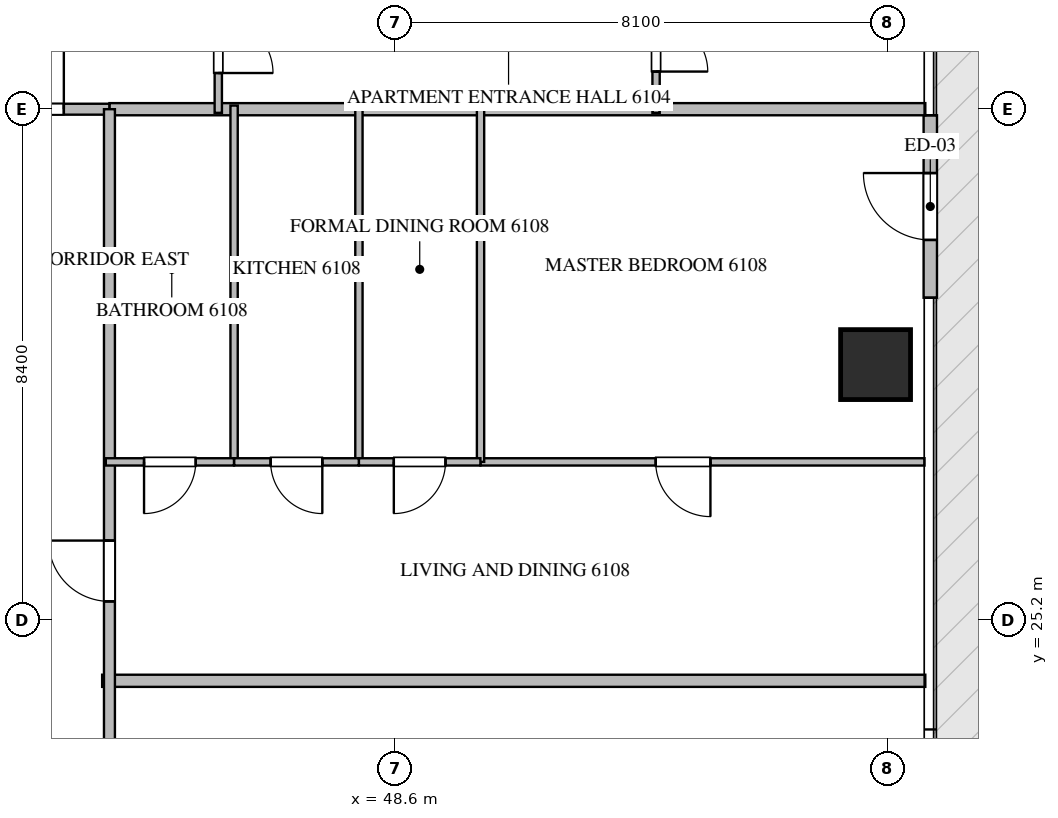
"""IFC4 building model, lengths in metres.
Left out: names, types, materials, properties, quantities, classifications, styles, units other than length and angle.
Written with IfcOpenShell. Run it as: python <this file> out.ifc"""

import sys

from ifc_helpers import new_model, si_unit, direction, frame, frame_2d, origin, origin_2d, place, context, subcontext, project, spatial, rectangle, extrude, source, transform, mapped, element, fill, save


model = new_model("IFC4")
c1 = context("Model", 3, precision=1e-05, world=origin(), true_north=direction((0.0, 1.0)))
c2 = subcontext(c1, "Body", "Model", "MODEL_VIEW")
j1 = project(units=[si_unit("LENGTHUNIT", "METRE"), si_unit("PLANEANGLEUNIT", "RADIAN")], contexts=[c1])
p1 = place(None, origin())
s1 = spatial("IfcSite", under=j1, at=p1, CompositionType="ELEMENT")
p2 = place(p1, origin())
s2 = spatial("IfcBuilding", under=s1, at=p2, CompositionType="ELEMENT")
p3 = place(p2, frame((0.0, 0.0, 245.1)))
s3 = spatial("IfcBuildingStorey", under=s2, at=p3, CompositionType="ELEMENT", Elevation=245.1)
m1 = source(origin(), c2, "Body", "SweptSolid", [
    extrude(rectangle(XDim=1.15, YDim=1.15, at=origin_2d()), origin(), (0.0, 0.0, 1.0), 3.85),
])
p4 = place(p3, frame((56.5, 29.4, -0.26), z_axis=(0.0, 0.0, 1.0), x_axis=(1.0, 0.0, 0.0)))
e1 = element("IfcColumn", 1, at=p4, inside=s3, PredefinedType="COLUMN", context=c2, shape_type="MappedRepresentation", body=[
    mapped(m1, transform((0.0, 0.0, 0.0), scale=1.0)),
])
p5 = place(p3, frame((57.4, 30.5, 0.0), z_axis=(0.0, 0.0, 1.0), x_axis=(0.0, 1.0, 0.0)))
e2 = element("IfcWall", 2, at=p5, inside=s3, PredefinedType="ELEMENTEDWALL", context=c2, shape_type="SweptSolid", body=[
    extrude(rectangle(XDim=3.0, YDim=0.22, at=frame_2d((1.5, 0.0))), origin(), (0.0, 0.0, 1.0), 3.575),
])
p6 = place(p5, frame((0.95, 0.0, 0.0)))
e3 = element("IfcOpeningElement", 3, at=p6, cuts=e2, PredefinedType="OPENING", context=c2, shape_type="SweptSolid", body=[
    extrude(rectangle(XDim=1.1, YDim=2.2, at=frame_2d((0.55, 1.1))), frame((0.0, 0.12, 0.0), z_axis=(0.0, -1.0, 0.0), x_axis=(1.0, 0.0, 0.0)), (0.0, 0.0, 1.0), 0.24),
])
p7 = place(p3, frame((43.78, 24.2, 0.0), z_axis=(0.0, 0.0, 1.0), x_axis=(1.0, 0.0, 0.0)))
e4 = element("IfcWall", 4, at=p7, inside=s3, PredefinedType="PARTITIONING", context=c2, shape_type="SweptSolid", body=[
    extrude(rectangle(XDim=13.538, YDim=0.2, at=frame_2d((6.769, 0.0))), origin(), (0.0, 0.0, 1.0), 3.59),
])
p8 = place(p3, frame((43.9, 33.6, 0.0), z_axis=(0.0, 0.0, 1.0), x_axis=(1.0, 0.0, 0.0)))
e5 = element("IfcWall", 5, at=p8, inside=s3, PredefinedType="PARTITIONING", context=c2, shape_type="SweptSolid", body=[
    extrude(rectangle(XDim=13.418, YDim=0.2, at=frame_2d((6.709, 0.0))), origin(), (0.0, 0.0, 1.0), 3.59),
])
p9 = place(p3, frame((41.402, 33.6, 0.0), z_axis=(0.0, 0.0, 1.0), x_axis=(1.0, 0.0, 0.0)))
e6 = element("IfcWall", 6, at=p9, inside=s3, PredefinedType="PARTITIONING", context=c2, shape_type="SweptSolid", body=[
    extrude(rectangle(XDim=2.496, YDim=0.18, at=frame_2d((1.248, 0.0))), origin(), (0.0, 0.0, 1.0), 3.59),
])
p10 = place(p9, frame((0.748, 0.0, 0.0)))
e7 = element("IfcOpeningElement", 7, at=p10, cuts=e6, PredefinedType="OPENING", context=c2, shape_type="SweptSolid", body=[
    extrude(rectangle(XDim=1.0, YDim=2.15, at=frame_2d((0.5, 1.075))), frame((0.0, 0.1, 0.0), z_axis=(0.0, -1.0, 0.0), x_axis=(1.0, 0.0, 0.0)), (0.0, 0.0, 1.0), 0.2),
])
p11 = place(p3, frame((43.9, 16.8, 0.0), z_axis=(0.0, 0.0, 1.0), x_axis=(0.0, 1.0, 0.0)))
e8 = element("IfcWall", 8, at=p11, inside=s3, PredefinedType="PARTITIONING", context=c2, shape_type="SweptSolid", body=[
    extrude(rectangle(XDim=16.8, YDim=0.18, at=frame_2d((8.4, 0.0))), origin(), (0.0, 0.0, 1.0), 3.59),
])
p12 = place(p11, frame((4.503, 0.0, 0.0)))
e9 = element("IfcOpeningElement", 9, at=p12, cuts=e8, PredefinedType="OPENING", context=c2, shape_type="SweptSolid", body=[
    extrude(rectangle(XDim=1.0, YDim=2.15, at=frame_2d((0.5, 1.075))), frame((0.0, 0.1, 0.0), z_axis=(0.0, -1.0, 0.0), x_axis=(1.0, 0.0, 0.0)), (0.0, 0.0, 1.0), 0.2),
])
p13 = place(p11, frame((8.706, 0.0, 0.0)))
e10 = element("IfcOpeningElement", 10, at=p13, cuts=e8, PredefinedType="OPENING", context=c2, shape_type="SweptSolid", body=[
    extrude(rectangle(XDim=1.0, YDim=2.15, at=frame_2d((0.5, 1.075))), frame((0.0, 0.1, 0.0), z_axis=(0.0, -1.0, 0.0), x_axis=(1.0, 0.0, 0.0)), (0.0, 0.0, 1.0), 0.2),
])
p14 = place(p3, frame((45.69, 35.75, 0.0), z_axis=(0.0, 0.0, 1.0), x_axis=(0.0, -1.0, 0.0)))
e11 = element("IfcWall", 11, at=p14, inside=s3, PredefinedType="PARTITIONING", context=c2, shape_type="SweptSolid", body=[
    extrude(rectangle(XDim=2.21, YDim=0.12, at=frame_2d((1.105, 0.0))), origin(), (0.0, 0.0, 1.0), 3.59),
])
p15 = place(p14, frame((0.655, 0.0, 0.0)))
e12 = element("IfcOpeningElement", 12, at=p15, cuts=e11, PredefinedType="OPENING", context=c2, shape_type="SweptSolid", body=[
    extrude(rectangle(XDim=0.9, YDim=2.1, at=frame_2d((0.45, 1.05))), frame((0.0, 0.07, 0.0), z_axis=(0.0, -1.0, 0.0), x_axis=(1.0, 0.0, 0.0)), (0.0, 0.0, 1.0), 0.14),
])
p16 = place(p3, frame((52.89, 35.748, 0.0), z_axis=(0.0, 0.0, 1.0), x_axis=(0.0, -1.0, 0.0)))
e13 = element("IfcWall", 13, at=p16, inside=s3, PredefinedType="PARTITIONING", context=c2, shape_type="SweptSolid", body=[
    extrude(rectangle(XDim=2.208, YDim=0.12, at=frame_2d((1.104, 0.0))), origin(), (0.0, 0.0, 1.0), 3.59),
])
p17 = place(p16, frame((0.679, 0.0, 0.0)))
e14 = element("IfcOpeningElement", 14, at=p17, cuts=e13, PredefinedType="OPENING", context=c2, shape_type="SweptSolid", body=[
    extrude(rectangle(XDim=0.85, YDim=2.1, at=frame_2d((0.425, 1.05))), frame((0.0, 0.07, 0.0), z_axis=(0.0, -1.0, 0.0), x_axis=(1.0, 0.0, 0.0)), (0.0, 0.0, 1.0), 0.14),
])
p18 = place(p3, frame((57.305, 27.8, 0.0), z_axis=(0.0, 0.0, 1.0), x_axis=(-1.0, 0.0, 0.0)))
e15 = element("IfcWall", 15, at=p18, inside=s3, PredefinedType="PARTITIONING", context=c2, shape_type="SweptSolid", body=[
    extrude(rectangle(XDim=7.302, YDim=0.12, at=frame_2d((3.651, 0.0))), origin(), (0.0, 0.0, 1.0), 3.59),
])
p19 = place(p18, frame((3.521, 0.0, 0.0)))
e16 = element("IfcOpeningElement", 16, at=p19, cuts=e15, PredefinedType="OPENING", context=c2, shape_type="SweptSolid", body=[
    extrude(rectangle(XDim=0.9, YDim=2.1, at=frame_2d((0.45, 1.05))), frame((0.0, 0.07, 0.0), z_axis=(0.0, -1.0, 0.0), x_axis=(1.0, 0.0, 0.0)), (0.0, 0.0, 1.0), 0.14),
])
for number, where, z_axis, x_axis in (
    (17, (50.003, 27.8, 0.0), (0.0, 0.0, 1.0), (0.0, 1.0, 0.0)),
    (18, (48.003, 27.8, 0.0), (0.0, 0.0, 1.0), (0.0, 1.0, 0.0)),
    (19, (45.95, 27.8, 0.0), (0.0, 0.0, 1.0), (0.0, 1.0, 0.0)),
):
    element("IfcWall", number, at=place(p3, frame(where, z_axis=z_axis, x_axis=x_axis)), inside=s3, PredefinedType="PARTITIONING", context=c2, shape_type="SweptSolid", body=[
        extrude(rectangle(XDim=5.86, YDim=0.12, at=frame_2d((2.93, 0.0))), origin(), (0.0, 0.0, 1.0), 3.59),
    ])
p20 = place(p3, frame((50.001, 27.8, 0.0), z_axis=(0.0, 0.0, 1.0), x_axis=(-1.0, 0.0, 0.0)))
e20 = element("IfcWall", 20, at=p20, inside=s3, PredefinedType="PARTITIONING", context=c2, shape_type="SweptSolid", body=[
    extrude(rectangle(XDim=1.998, YDim=0.12, at=frame_2d((0.999, 0.0))), origin(), (0.0, 0.0, 1.0), 3.59),
])
p21 = place(p20, frame((0.574, 0.0, 0.0)))
e21 = element("IfcOpeningElement", 21, at=p21, cuts=e20, PredefinedType="OPENING", context=c2, shape_type="SweptSolid", body=[
    extrude(rectangle(XDim=0.85, YDim=2.1, at=frame_2d((0.425, 1.05))), frame((0.0, 0.07, 0.0), z_axis=(0.0, -1.0, 0.0), x_axis=(1.0, 0.0, 0.0)), (0.0, 0.0, 1.0), 0.14),
])
p22 = place(p3, frame((48.001, 27.8, 0.0), z_axis=(0.0, 0.0, 1.0), x_axis=(-1.0, 0.0, 0.0)))
e22 = element("IfcWall", 22, at=p22, inside=s3, PredefinedType="PARTITIONING", context=c2, shape_type="SweptSolid", body=[
    extrude(rectangle(XDim=2.051, YDim=0.12, at=frame_2d((1.025, 0.0))), origin(), (0.0, 0.0, 1.0), 3.59),
])
p23 = place(p22, frame((0.6, 0.0, 0.0)))
e23 = element("IfcOpeningElement", 23, at=p23, cuts=e22, PredefinedType="OPENING", context=c2, shape_type="SweptSolid", body=[
    extrude(rectangle(XDim=0.85, YDim=2.1, at=frame_2d((0.425, 1.05))), frame((0.0, 0.07, 0.0), z_axis=(0.0, -1.0, 0.0), x_axis=(1.0, 0.0, 0.0)), (0.0, 0.0, 1.0), 0.14),
])
p24 = place(p3, frame((45.948, 27.8, 0.0), z_axis=(0.0, 0.0, 1.0), x_axis=(-1.0, 0.0, 0.0)))
e24 = element("IfcWall", 24, at=p24, inside=s3, PredefinedType="PARTITIONING", context=c2, shape_type="SweptSolid", body=[
    extrude(rectangle(XDim=2.108, YDim=0.12, at=frame_2d((1.054, 0.0))), origin(), (0.0, 0.0, 1.0), 3.59),
])
p25 = place(p24, frame((0.629, 0.0, 0.0)))
e25 = element("IfcOpeningElement", 25, at=p25, cuts=e24, PredefinedType="OPENING", context=c2, shape_type="SweptSolid", body=[
    extrude(rectangle(XDim=0.85, YDim=2.1, at=frame_2d((0.425, 1.05))), frame((0.0, 0.07, 0.0), z_axis=(0.0, -1.0, 0.0), x_axis=(1.0, 0.0, 0.0)), (0.0, 0.0, 1.0), 0.14),
])
m2 = source(origin(), c2, "Body", "SweptSolid", [
    extrude(rectangle(XDim=1.1, YDim=2.2, at=frame_2d((0.55, 1.1))), frame((0.0, 0.025, 0.0), z_axis=(0.0, -1.0, 0.0), x_axis=(1.0, 0.0, 0.0)), (0.0, 0.0, 1.0), 0.05),
])
p26 = place(p6, origin())
e26 = element("IfcDoor", 26, at=p26, inside=s3, OperationType="SINGLE_SWING_RIGHT", PredefinedType="DOOR", context=c2, shape_type="MappedRepresentation", body=[
    mapped(m2, transform((0.0, 0.0, 0.0), scale=1.0)),
])
fill(e3, e26)
m3 = source(origin(), c2, "Body", "SweptSolid", [
    extrude(rectangle(XDim=1.0, YDim=2.15, at=frame_2d((0.5, 1.075))), frame((0.0, 0.025, 0.0), z_axis=(0.0, -1.0, 0.0), x_axis=(1.0, 0.0, 0.0)), (0.0, 0.0, 1.0), 0.05),
])
p27 = place(p10, origin())
e27 = element("IfcDoor", 27, at=p27, inside=s3, OperationType="SINGLE_SWING_RIGHT", PredefinedType="DOOR", context=c2, shape_type="MappedRepresentation", body=[
    mapped(m3, transform((0.0, 0.0, 0.0), scale=1.0)),
])
fill(e7, e27)
p28 = place(p13, origin())
e28 = element("IfcDoor", 28, at=p28, inside=s3, OperationType="SINGLE_SWING_RIGHT", PredefinedType="DOOR", context=c2, shape_type="MappedRepresentation", body=[
    mapped(m3, transform((0.0, 0.0, 0.0), scale=1.0)),
])
fill(e10, e28)
m4 = source(origin(), c2, "Body", "SweptSolid", [
    extrude(rectangle(XDim=0.9, YDim=2.1, at=frame_2d((0.45, 1.05))), frame((0.0, 0.025, 0.0), z_axis=(0.0, -1.0, 0.0), x_axis=(1.0, 0.0, 0.0)), (0.0, 0.0, 1.0), 0.05),
])
p29 = place(p15, origin())
e29 = element("IfcDoor", 29, at=p29, inside=s3, OperationType="SINGLE_SWING_RIGHT", PredefinedType="DOOR", context=c2, shape_type="MappedRepresentation", body=[
    mapped(m4, transform((0.0, 0.0, 0.0), scale=1.0)),
])
fill(e12, e29)
m5 = source(origin(), c2, "Body", "SweptSolid", [
    extrude(rectangle(XDim=0.85, YDim=2.1, at=frame_2d((0.425, 1.05))), frame((0.0, 0.025, 0.0), z_axis=(0.0, -1.0, 0.0), x_axis=(1.0, 0.0, 0.0)), (0.0, 0.0, 1.0), 0.05),
])
p30 = place(p17, origin())
e30 = element("IfcDoor", 30, at=p30, inside=s3, OperationType="SINGLE_SWING_RIGHT", PredefinedType="DOOR", context=c2, shape_type="MappedRepresentation", body=[
    mapped(m5, transform((0.0, 0.0, 0.0), scale=1.0)),
])
fill(e14, e30)
p31 = place(p19, origin())
e31 = element("IfcDoor", 31, at=p31, inside=s3, OperationType="SINGLE_SWING_LEFT", PredefinedType="DOOR", context=c2, shape_type="MappedRepresentation", body=[
    mapped(m4, transform((0.0, 0.0, 0.0), scale=1.0)),
])
fill(e16, e31)
p32 = place(p21, origin())
e32 = element("IfcDoor", 32, at=p32, inside=s3, OperationType="SINGLE_SWING_RIGHT", PredefinedType="DOOR", context=c2, shape_type="MappedRepresentation", body=[
    mapped(m5, transform((0.0, 0.0, 0.0), scale=1.0)),
])
fill(e21, e32)
p33 = place(p23, origin())
e33 = element("IfcDoor", 33, at=p33, inside=s3, OperationType="SINGLE_SWING_LEFT", PredefinedType="DOOR", context=c2, shape_type="MappedRepresentation", body=[
    mapped(m5, transform((0.0, 0.0, 0.0), scale=1.0)),
])
fill(e23, e33)
p34 = place(p25, origin())
e34 = element("IfcDoor", 34, at=p34, inside=s3, OperationType="SINGLE_SWING_RIGHT", PredefinedType="DOOR", context=c2, shape_type="MappedRepresentation", body=[
    mapped(m5, transform((0.0, 0.0, 0.0), scale=1.0)),
])
fill(e25, e34)
save(model, sys.argv[1])
